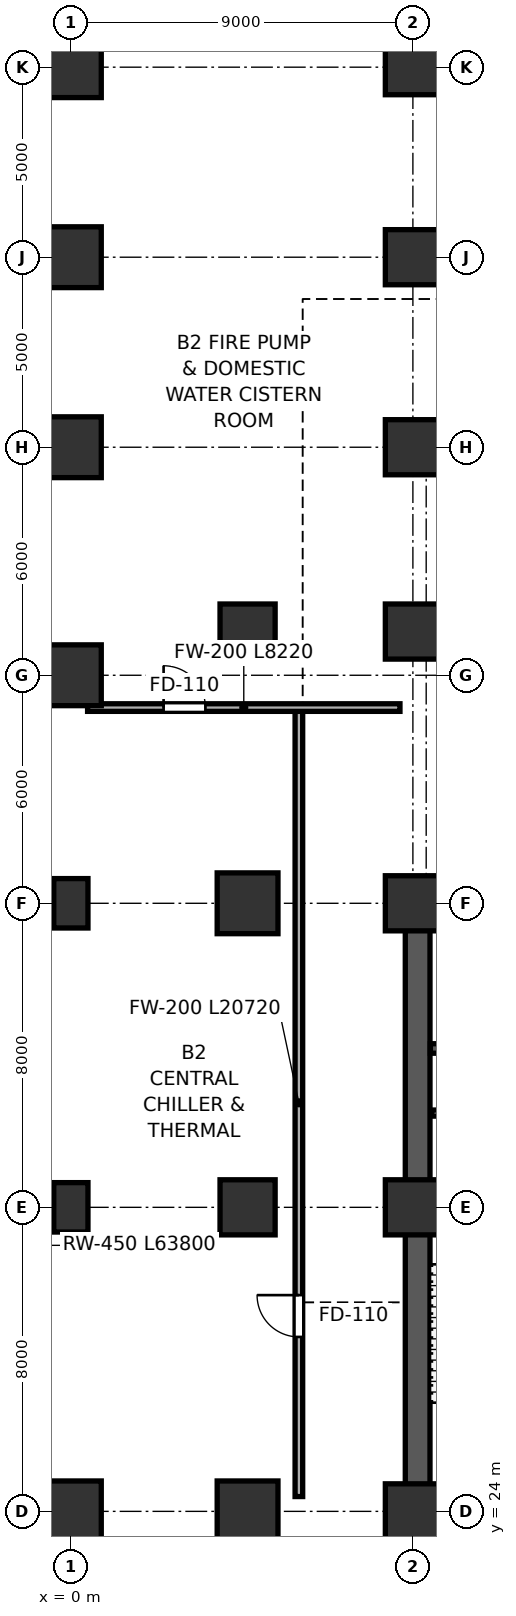
"""IFC4 building model, lengths in metres.
Left out: names, types, materials, properties, quantities, classifications, styles, units other than length and angle.
Written with IfcOpenShell. Run it as: python <this file> out.ifc"""

import sys

from ifc_helpers import new_model, si_unit, direction, frame, frame_2d, origin, origin_2d, place, context, subcontext, project, spatial, rectangle, extrude, source, transform, mapped, element, fill, save


model = new_model("IFC4")
c1 = context("Model", 3, precision=1e-05, world=origin(), true_north=direction((0.0, 1.0)))
c2 = subcontext(c1, "Body", "Model", "MODEL_VIEW")
j1 = project(units=[si_unit("LENGTHUNIT", "METRE"), si_unit("PLANEANGLEUNIT", "RADIAN")], contexts=[c1])
p1 = place(None, origin())
s1 = spatial("IfcSite", under=j1, at=p1, CompositionType="ELEMENT")
p2 = place(p1, origin())
s2 = spatial("IfcBuilding", under=s1, at=p2, CompositionType="ELEMENT")
p3 = place(p2, frame((0.0, 0.0, -9.6)))
s3 = spatial("IfcBuildingStorey", under=s2, at=p3, CompositionType="ELEMENT", Elevation=-9.6)
m1 = source(origin(), c2, "Body", "SweptSolid", [
    extrude(rectangle(XDim=1.6, YDim=1.6, at=origin_2d()), origin(), (0.0, 0.0, 1.0), 4.799),
])
p4 = place(p3, frame((0.0, 24.0, 0.0), z_axis=(0.0, 0.0, 1.0), x_axis=(1.0, 0.0, 0.0)))
e1 = element("IfcColumn", 1, at=p4, inside=s3, PredefinedType="COLUMN", context=c2, shape_type="MappedRepresentation", body=[
    mapped(m1, transform((0.0, 0.0, 0.0), scale=1.0)),
])
m2 = source(origin(), c2, "Body", "SweptSolid", [
    extrude(rectangle(XDim=0.9, YDim=1.3, at=origin_2d()), origin(), (0.0, 0.0, 1.0), 4.799),
])
for number, where, z_axis, x_axis in (
    (2, (0.0, 32.0, 0.0), (0.0, 0.0, 1.0), (1.0, 0.0, 0.0)),
    (3, (0.0, 40.0, 0.0), (0.0, 0.0, 1.0), (1.0, 0.0, 0.0)),
):
    element("IfcColumn", number, at=place(p3, frame(where, z_axis=z_axis, x_axis=x_axis)), inside=s3, PredefinedType="PILASTER", context=c2, shape_type="MappedRepresentation", body=[
        mapped(m2, transform((0.0, 0.0, 0.0), scale=1.0)),
    ])
for number, where, z_axis, x_axis in (
    (4, (0.0, 46.0, 0.0), (0.0, 0.0, 1.0), (1.0, 0.0, 0.0)),
    (5, (0.0, 52.0, 0.0), (0.0, 0.0, 1.0), (1.0, 0.0, 0.0)),
    (6, (0.0, 57.0, 0.0), (0.0, 0.0, 1.0), (1.0, 0.0, 0.0)),
    (7, (0.0, 62.0, 0.0), (0.0, 0.0, 1.0), (1.0, 0.0, 0.0)),
):
    element("IfcColumn", number, at=place(p3, frame(where, z_axis=z_axis, x_axis=x_axis)), inside=s3, PredefinedType="COLUMN", context=c2, shape_type="MappedRepresentation", body=[
        mapped(m1, transform((0.0, 0.0, 0.0), scale=1.0)),
    ])
m3 = source(origin(), c2, "Body", "SweptSolid", [
    extrude(rectangle(XDim=1.45, YDim=1.45, at=origin_2d()), origin(), (0.0, 0.0, 1.0), 4.799),
])
for number, where, z_axis, x_axis in (
    (8, (9.0, 24.0, 0.0), (0.0, 0.0, 1.0), (1.0, 0.0, 0.0)),
    (9, (9.0, 32.0, 0.0), (0.0, 0.0, 1.0), (1.0, 0.0, 0.0)),
    (10, (9.0, 40.0, 0.0), (0.0, 0.0, 1.0), (1.0, 0.0, 0.0)),
    (11, (9.0, 52.0, 0.0), (0.0, 0.0, 1.0), (1.0, 0.0, 0.0)),
    (12, (9.0, 57.0, 0.0), (0.0, 0.0, 1.0), (1.0, 0.0, 0.0)),
):
    element("IfcColumn", number, at=place(p3, frame(where, z_axis=z_axis, x_axis=x_axis)), inside=s3, PredefinedType="COLUMN", context=c2, shape_type="MappedRepresentation", body=[
        mapped(m3, transform((0.0, 0.0, 0.0), scale=1.0)),
    ])
m4 = source(origin(), c2, "Body", "SweptSolid", [
    extrude(rectangle(XDim=1.45, YDim=1.45, at=origin_2d()), origin(), (0.0, 0.0, 1.0), 4.799),
])
p5 = place(p3, frame((9.0, 62.0, 0.0), z_axis=(0.0, 0.0, 1.0), x_axis=(1.0, 0.0, 0.0)))
e13 = element("IfcColumn", 13, at=p5, inside=s3, PredefinedType="COLUMN", context=c2, shape_type="MappedRepresentation", body=[
    mapped(m4, transform((0.0, 0.0, 0.0), scale=1.0)),
])
p6 = place(p3, frame((9.0, 47.15, 0.0), z_axis=(0.0, 0.0, 1.0), x_axis=(1.0, 0.0, 0.0)))
e14 = element("IfcColumn", 14, at=p6, inside=s3, PredefinedType="COLUMN", context=c2, shape_type="MappedRepresentation", body=[
    mapped(m3, transform((0.0, 0.0, 0.0), scale=1.0)),
])
m5 = source(origin(), c2, "Body", "SweptSolid", [
    extrude(rectangle(XDim=1.6, YDim=1.6, at=origin_2d()), origin(), (0.0, 0.0, 1.0), 4.799),
])
p7 = place(p3, frame((4.65, 24.0, 0.0), z_axis=(0.0, 0.0, 1.0), x_axis=(1.0, 0.0, 0.0)))
e15 = element("IfcColumn", 15, at=p7, inside=s3, PredefinedType="COLUMN", context=c2, shape_type="MappedRepresentation", body=[
    mapped(m5, transform((0.0, 0.0, 0.0), scale=1.0)),
])
p8 = place(p3, frame((4.65, 32.0, 0.0), z_axis=(0.0, 0.0, 1.0), x_axis=(1.0, 0.0, 0.0)))
e16 = element("IfcColumn", 16, at=p8, inside=s3, PredefinedType="COLUMN", context=c2, shape_type="MappedRepresentation", body=[
    mapped(m3, transform((0.0, 0.0, 0.0), scale=1.0)),
])
p9 = place(p3, frame((4.65, 40.0, 0.0), z_axis=(0.0, 0.0, 1.0), x_axis=(1.0, 0.0, 0.0)))
e17 = element("IfcColumn", 17, at=p9, inside=s3, PredefinedType="COLUMN", context=c2, shape_type="MappedRepresentation", body=[
    mapped(m5, transform((0.0, 0.0, 0.0), scale=1.0)),
])
p10 = place(p3, frame((4.65, 47.15, 0.0), z_axis=(0.0, 0.0, 1.0), x_axis=(1.0, 0.0, 0.0)))
e18 = element("IfcColumn", 18, at=p10, inside=s3, PredefinedType="COLUMN", context=c2, shape_type="MappedRepresentation", body=[
    mapped(m3, transform((0.0, 0.0, 0.0), scale=1.0)),
])
p11 = place(p3, frame((9.125, 24.45, 0.0), z_axis=(0.0, 0.0, 1.0), x_axis=(0.0, 1.0, 0.0)))
e19 = element("IfcWall", 19, at=p11, inside=s3, PredefinedType="SHEAR", context=c2, shape_type="SweptSolid", body=[
    extrude(rectangle(XDim=15.1, YDim=0.65, at=frame_2d((7.55, 0.0))), origin(), (0.0, 0.0, 1.0), 4.52),
])
for number, where, z_axis, x_axis in (
    (20, (8.8, 24.125, 0.0), (0.0, 0.0, 1.0), (1.0, 0.0, 0.0)),
    (21, (8.8, 39.875, 0.0), (0.0, 0.0, 1.0), (1.0, 0.0, 0.0)),
):
    element("IfcWall", number, at=place(p3, frame(where, z_axis=z_axis, x_axis=x_axis)), inside=s3, PredefinedType="SHEAR", context=c2, shape_type="SweptSolid", body=[
        extrude(rectangle(XDim=18.4, YDim=0.65, at=frame_2d((9.2, 0.0))), origin(), (0.0, 0.0, 1.0), 4.52),
    ])
p12 = place(p3, frame((9.46, 32.075, 0.0), z_axis=(0.0, 0.0, 1.0), x_axis=(1.0, 0.0, 0.0)))
e22 = element("IfcWall", 22, at=p12, inside=s3, PredefinedType="SHEAR", context=c2, shape_type="SweptSolid", body=[
    extrude(rectangle(XDim=3.29, YDim=0.25, at=frame_2d((1.645, 0.0))), origin(), (0.0, 0.0, 1.0), 4.52),
])
p13 = place(p3, frame((9.46, 36.18, 0.0), z_axis=(0.0, 0.0, 1.0), x_axis=(1.0, 0.0, 0.0)))
e23 = element("IfcWall", 23, at=p13, inside=s3, PredefinedType="SHEAR", context=c2, shape_type="SweptSolid", body=[
    extrude(rectangle(XDim=3.79, YDim=0.25, at=frame_2d((1.895, 0.0))), origin(), (0.0, 0.0, 1.0), 4.52),
])
p14 = place(p13, frame((2.62, 0.0, 0.0)))
e24 = element("IfcOpeningElement", 24, at=p14, cuts=e23, PredefinedType="OPENING", context=c2, shape_type="SweptSolid", body=[
    extrude(rectangle(XDim=0.85, YDim=2.1, at=frame_2d((0.425, 1.05))), frame((0.0, 0.135, 0.0), z_axis=(0.0, -1.0, 0.0), x_axis=(1.0, 0.0, 0.0)), (0.0, 0.0, 1.0), 0.27),
])
p15 = place(p13, frame((0.85, 0.0, 0.0)))
e25 = element("IfcOpeningElement", 25, at=p15, cuts=e23, PredefinedType="OPENING", context=c2, shape_type="SweptSolid", body=[
    extrude(rectangle(XDim=1.3, YDim=2.25, at=frame_2d((0.65, 1.125))), frame((0.0, 0.135, 0.0), z_axis=(0.0, -1.0, 0.0), x_axis=(1.0, 0.0, 0.0)), (0.0, 0.0, 1.0), 0.27),
])
p16 = place(p3, frame((9.49, 34.48, 0.0), z_axis=(0.0, 0.0, 1.0), x_axis=(1.0, 0.0, 0.0)))
e26 = element("IfcWall", 26, at=p16, inside=s3, PredefinedType="PARTITIONING", context=c2, shape_type="SweptSolid", body=[
    extrude(rectangle(XDim=3.7, YDim=0.16, at=frame_2d((1.85, 0.0))), origin(), (0.0, 0.0, 1.0), 4.52),
])
p17 = place(p16, frame((1.15, 0.0, 0.0)))
e27 = element("IfcOpeningElement", 27, at=p17, cuts=e26, PredefinedType="OPENING", context=c2, shape_type="SweptSolid", body=[
    extrude(rectangle(XDim=0.9, YDim=2.15, at=frame_2d((0.45, 1.075))), frame((0.0, 0.09, 0.0), z_axis=(0.0, -1.0, 0.0), x_axis=(1.0, 0.0, 0.0)), (0.0, 0.0, 1.0), 0.18),
])
p18 = place(p3, frame((6.0, 24.39, 0.0), z_axis=(0.0, 0.0, 1.0), x_axis=(0.0, 1.0, 0.0)))
e28 = element("IfcWall", 28, at=p18, inside=s3, PredefinedType="SOLIDWALL", context=c2, shape_type="SweptSolid", body=[
    extrude(rectangle(XDim=20.72, YDim=0.2, at=frame_2d((10.36, 0.0))), origin(), (0.0, 0.0, 1.0), 3.655),
])
p19 = place(p18, frame((4.2, 0.0, 0.0)))
e29 = element("IfcOpeningElement", 29, at=p19, cuts=e28, PredefinedType="OPENING", context=c2, shape_type="SweptSolid", body=[
    extrude(rectangle(XDim=1.1, YDim=2.2, at=frame_2d((0.55, 1.1))), frame((0.0, 0.11, 0.0), z_axis=(0.0, -1.0, 0.0), x_axis=(1.0, 0.0, 0.0)), (0.0, 0.0, 1.0), 0.22),
])
p20 = place(p3, frame((0.44, 45.15, 0.0), z_axis=(0.0, 0.0, 1.0), x_axis=(1.0, 0.0, 0.0)))
e30 = element("IfcWall", 30, at=p20, inside=s3, PredefinedType="SOLIDWALL", context=c2, shape_type="SweptSolid", body=[
    extrude(rectangle(XDim=8.22, YDim=0.2, at=frame_2d((4.11, 0.0))), origin(), (0.0, 0.0, 1.0), 3.883),
])
p21 = place(p20, frame((2.0, 0.0, 0.0)))
e31 = element("IfcOpeningElement", 31, at=p21, cuts=e30, PredefinedType="OPENING", context=c2, shape_type="SweptSolid", body=[
    extrude(rectangle(XDim=1.1, YDim=2.2, at=frame_2d((0.55, 1.1))), frame((0.0, 0.11, 0.0), z_axis=(0.0, -1.0, 0.0), x_axis=(1.0, 0.0, 0.0)), (0.0, 0.0, 1.0), 0.22),
])
m6 = source(origin(), c2, "Body", "SweptSolid", [
    extrude(rectangle(XDim=1.1, YDim=2.2, at=frame_2d((0.55, 1.1))), frame((0.0, 0.025, 0.0), z_axis=(0.0, -1.0, 0.0), x_axis=(1.0, 0.0, 0.0)), (0.0, 0.0, 1.0), 0.05),
])
p22 = place(p19, origin())
e32 = element("IfcDoor", 32, at=p22, inside=s3, OperationType="SINGLE_SWING_RIGHT", PredefinedType="DOOR", context=c2, shape_type="MappedRepresentation", body=[
    mapped(m6, transform((0.0, 0.0, 0.0), scale=1.0)),
])
fill(e29, e32)
p23 = place(p21, origin())
e33 = element("IfcDoor", 33, at=p23, inside=s3, OperationType="SINGLE_SWING_LEFT", PredefinedType="DOOR", context=c2, shape_type="MappedRepresentation", body=[
    mapped(m6, transform((0.0, 0.0, 0.0), scale=1.0)),
])
fill(e31, e33)
save(model, sys.argv[1])
